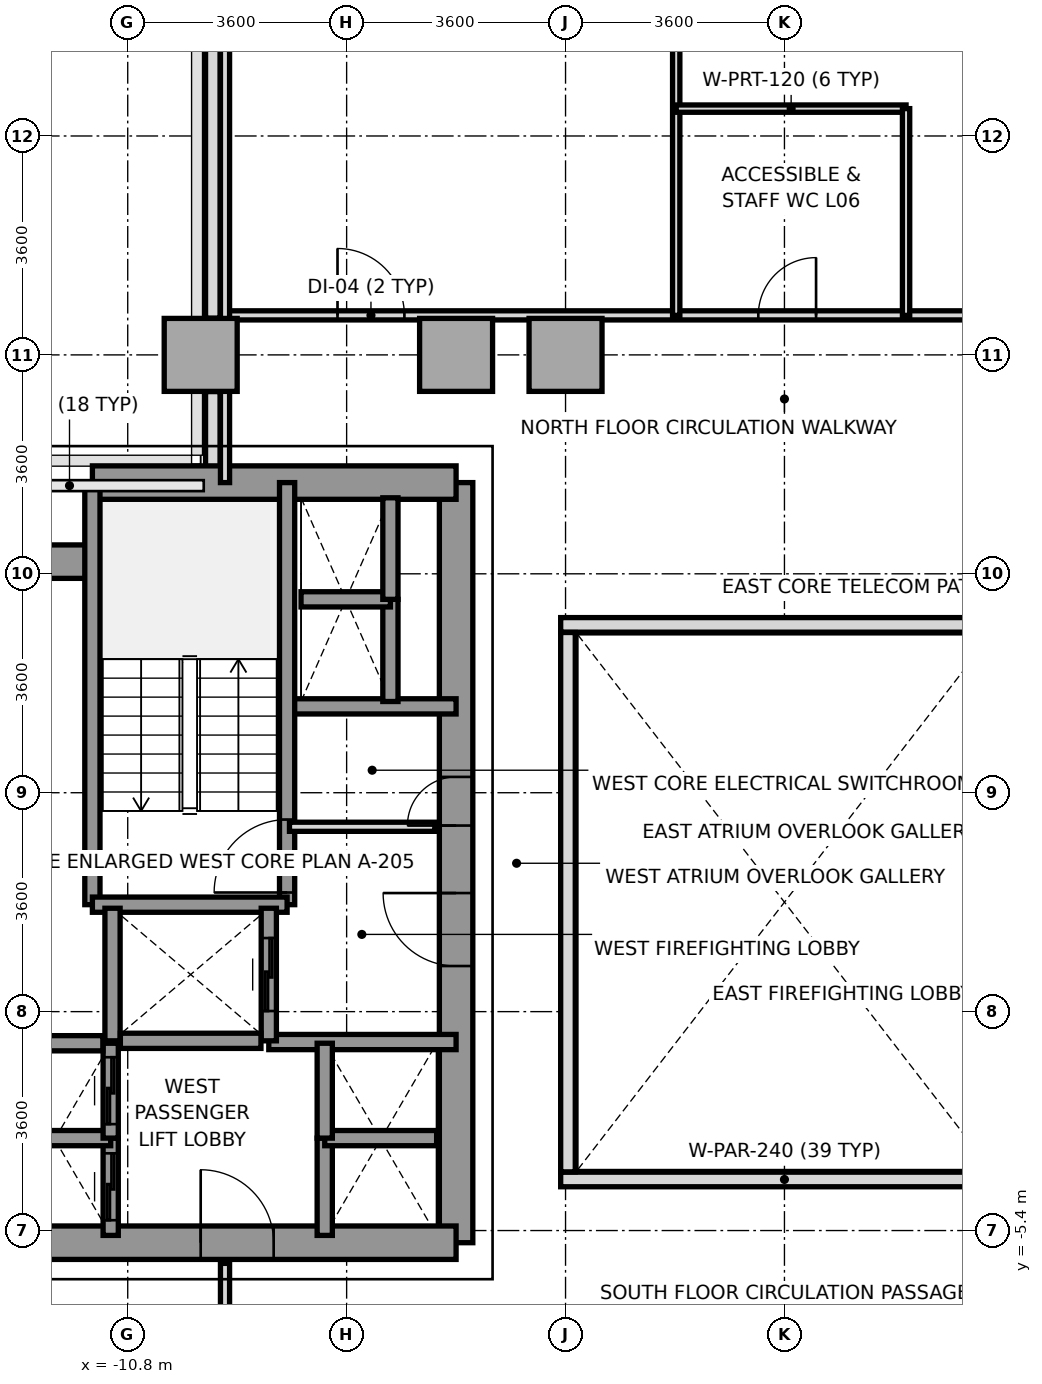
"""IFC4 building model, lengths in metres.
Left out: names, types, materials, properties, quantities, classifications, styles, units other than length and angle.
Written with IfcOpenShell. Run it as: python <this file> out.ifc"""

import sys

from ifc_helpers import new_model, si_unit, direction, frame, frame_2d, origin, origin_2d, place, context, subcontext, project, spatial, rectangle, extrude, source, transform, mapped, element, fill, save


model = new_model("IFC4")
c1 = context("Model", 3, precision=1e-05, world=origin(), true_north=direction((0.0, 1.0)))
c2 = subcontext(c1, "Body", "Model", "MODEL_VIEW")
j1 = project(units=[si_unit("LENGTHUNIT", "METRE"), si_unit("PLANEANGLEUNIT", "RADIAN")], contexts=[c1])
p1 = place(None, origin())
s1 = spatial("IfcSite", under=j1, at=p1, CompositionType="ELEMENT")
p2 = place(p1, origin())
s2 = spatial("IfcBuilding", under=s1, at=p2, CompositionType="ELEMENT")
p3 = place(p2, frame((0.0, 0.0, 30.6)))
s3 = spatial("IfcBuildingStorey", under=s2, at=p3, CompositionType="ELEMENT", Elevation=30.6)
m1 = source(origin(), c2, "Body", "SweptSolid", [
    extrude(rectangle(XDim=1.2, YDim=1.2, at=origin_2d()), origin(), (0.0, 0.0, 1.0), 3.2),
])
for number, where, z_axis, x_axis in (
    (1, (-9.6, 9.0, 0.0), (0.0, 0.0, 1.0), (1.0, 0.0, 0.0)),
    (2, (-5.4, 9.0, 0.0), (0.0, 0.0, 1.0), (1.0, 0.0, 0.0)),
    (3, (-3.6, 9.0, 0.0), (0.0, 0.0, 1.0), (1.0, 0.0, 0.0)),
):
    element("IfcColumn", number, at=place(p3, frame(where, z_axis=z_axis, x_axis=x_axis)), inside=s3, PredefinedType="COLUMN", context=c2, shape_type="MappedRepresentation", body=[
        mapped(m1, transform((0.0, 0.0, 0.0), x_axis=(1.0, 0.0, 0.0), y_axis=(0.0, 1.0, 0.0), z_axis=(0.0, 0.0, 1.0), scale=1.0)),
    ])
p4 = place(p3, frame((-9.4, 6.953, 0.0), z_axis=(0.0, 0.0, 1.0), x_axis=(0.0, 1.0, 0.0)))
e4 = element("IfcWall", 4, at=p4, inside=s3, PredefinedType="PARAPET", context=c2, shape_type="SweptSolid", body=[
    extrude(rectangle(XDim=1.444, YDim=0.24, at=frame_2d((0.722, 0.0))), origin(), (0.0, 0.0, 1.0), 1.15),
])
p5 = place(p3, frame((-9.4, 9.603, 0.0), z_axis=(0.0, 0.0, 1.0), x_axis=(0.0, 1.0, 0.0)))
e5 = element("IfcWall", 5, at=p5, inside=s3, PredefinedType="PARAPET", context=c2, shape_type="SweptSolid", body=[
    extrude(rectangle(XDim=6.0, YDim=0.24, at=frame_2d((3.0, 0.0))), origin(), (0.0, 0.0, 1.0), 1.15),
])
p6 = place(p3, frame((-5.4, -5.6, 0.0), z_axis=(0.0, 0.0, 1.0), x_axis=(0.0, 1.0, 0.0)))
e6 = element("IfcWall", 6, at=p6, inside=s3, PredefinedType="SHEAR", context=c2, shape_type="SweptSolid", body=[
    extrude(rectangle(XDim=12.5, YDim=0.55, at=frame_2d((6.25, 0.0))), origin(), (0.0, 0.0, 1.0), 3.2),
])
p7 = place(p6, frame((4.55, 0.0, 0.0)))
e7 = element("IfcOpeningElement", 7, at=p7, cuts=e6, PredefinedType="OPENING", context=c2, shape_type="SweptSolid", body=[
    extrude(rectangle(XDim=1.2, YDim=2.2, at=frame_2d((0.6, 1.1))), frame((0.0, 0.285, 0.0), z_axis=(0.0, -1.0, 0.0), x_axis=(1.0, 0.0, 0.0)), (0.0, 0.0, 1.0), 0.57),
])
p8 = place(p6, frame((6.86, 0.0, 0.0)))
e8 = element("IfcOpeningElement", 8, at=p8, cuts=e6, PredefinedType="OPENING", context=c2, shape_type="SweptSolid", body=[
    extrude(rectangle(XDim=0.8, YDim=2.1, at=frame_2d((0.4, 1.05))), frame((0.0, 0.285, 0.0), z_axis=(0.0, -1.0, 0.0), x_axis=(1.0, 0.0, 0.0)), (0.0, 0.0, 1.0), 0.57),
])
p9 = place(p3, frame((-11.381, 6.9, 0.0), z_axis=(0.0, 0.0, 1.0), x_axis=(1.0, 0.0, 0.0)))
e9 = element("IfcWall", 9, at=p9, inside=s3, PredefinedType="SHEAR", context=c2, shape_type="SweptSolid", body=[
    extrude(rectangle(XDim=5.981, YDim=0.55, at=frame_2d((2.991, 0.0))), origin(), (0.0, 0.0, 1.0), 3.2),
])
p10 = place(p3, frame((-13.2, 5.6, 0.0), z_axis=(0.0, 0.0, 1.0), x_axis=(1.0, 0.0, 0.0)))
e10 = element("IfcWall", 10, at=p10, inside=s3, PredefinedType="SHEAR", context=c2, shape_type="SweptSolid", body=[
    extrude(rectangle(XDim=1.819, YDim=0.55, at=frame_2d((0.909, 0.0))), origin(), (0.0, 0.0, 1.0), 3.2),
])
p11 = place(p3, frame((-13.2, -5.6, 0.0), z_axis=(0.0, 0.0, 1.0), x_axis=(1.0, 0.0, 0.0)))
e11 = element("IfcWall", 11, at=p11, inside=s3, PredefinedType="SHEAR", context=c2, shape_type="SweptSolid", body=[
    extrude(rectangle(XDim=7.8, YDim=0.55, at=frame_2d((3.9, 0.0))), origin(), (0.0, 0.0, 1.0), 3.2),
])
p12 = place(p11, frame((3.6, 0.0, 0.0)))
e12 = element("IfcOpeningElement", 12, at=p12, cuts=e11, PredefinedType="OPENING", context=c2, shape_type="SweptSolid", body=[
    extrude(rectangle(XDim=1.2, YDim=2.2, at=frame_2d((0.6, 1.1))), frame((0.0, 0.285, 0.0), z_axis=(0.0, -1.0, 0.0), x_axis=(1.0, 0.0, 0.0)), (0.0, 0.0, 1.0), 0.57),
])
p13 = place(p3, frame((-8.18, 3.22, 0.0), z_axis=(0.0, 0.0, 1.0), x_axis=(1.0, 0.0, 0.0)))
e13 = element("IfcWall", 13, at=p13, inside=s3, PredefinedType="SOLIDWALL", context=c2, shape_type="SweptSolid", body=[
    extrude(rectangle(XDim=2.78, YDim=0.25, at=frame_2d((1.39, 0.0))), origin(), (0.0, 0.0, 1.0), 3.2),
])
p14 = place(p3, frame((-8.48, -2.3, 0.0), z_axis=(0.0, 0.0, 1.0), x_axis=(1.0, 0.0, 0.0)))
e14 = element("IfcWall", 14, at=p14, inside=s3, PredefinedType="SOLIDWALL", context=c2, shape_type="SweptSolid", body=[
    extrude(rectangle(XDim=3.08, YDim=0.25, at=frame_2d((1.54, 0.0))), origin(), (0.0, 0.0, 1.0), 3.2),
])
p15 = place(p3, frame((-8.179, -0.041, 0.0), z_axis=(0.0, 0.0, 1.0), x_axis=(0.0, 1.0, 0.0)))
e15 = element("IfcWall", 15, at=p15, inside=s3, PredefinedType="SOLIDWALL", context=c2, shape_type="SweptSolid", body=[
    extrude(rectangle(XDim=6.941, YDim=0.25, at=frame_2d((3.47, 0.0))), origin(), (0.0, 0.0, 1.0), 3.2),
])
p16 = place(p15, frame((0.2, 0.0, 0.0)))
e16 = element("IfcOpeningElement", 16, at=p16, cuts=e15, PredefinedType="OPENING", context=c2, shape_type="SweptSolid", body=[
    extrude(rectangle(XDim=1.2, YDim=2.2, at=frame_2d((0.6, 1.1))), frame((0.0, 0.135, 0.0), z_axis=(0.0, -1.0, 0.0), x_axis=(1.0, 0.0, 0.0)), (0.0, 0.0, 1.0), 0.27),
])
p17 = place(p3, frame((-11.381, -0.041, 0.0), z_axis=(0.0, 0.0, 1.0), x_axis=(0.0, 1.0, 0.0)))
e17 = element("IfcWall", 17, at=p17, inside=s3, PredefinedType="SOLIDWALL", context=c2, shape_type="SweptSolid", body=[
    extrude(rectangle(XDim=6.941, YDim=0.25, at=frame_2d((3.47, 0.0))), origin(), (0.0, 0.0, 1.0), 3.2),
])
p18 = place(p3, frame((-11.381, -0.041, 0.0), z_axis=(0.0, 0.0, 1.0), x_axis=(1.0, 0.0, 0.0)))
e18 = element("IfcWall", 18, at=p18, inside=s3, PredefinedType="SOLIDWALL", context=c2, shape_type="SweptSolid", body=[
    extrude(rectangle(XDim=3.202, YDim=0.25, at=frame_2d((1.601, 0.0))), origin(), (0.0, 0.0, 1.0), 3.2),
])
p19 = place(p3, frame((-11.05, -2.28, 0.0), z_axis=(0.0, 0.0, 1.0), x_axis=(0.0, 1.0, 0.0)))
e19 = element("IfcWall", 19, at=p19, inside=s3, PredefinedType="SOLIDWALL", context=c2, shape_type="SweptSolid", body=[
    extrude(rectangle(XDim=2.18, YDim=0.25, at=frame_2d((1.09, 0.0))), origin(), (0.0, 0.0, 1.0), 3.2),
])
p20 = place(p3, frame((-8.48, -2.28, 0.0), z_axis=(0.0, 0.0, 1.0), x_axis=(0.0, 1.0, 0.0)))
e20 = element("IfcWall", 20, at=p20, inside=s3, PredefinedType="SOLIDWALL", context=c2, shape_type="SweptSolid", body=[
    extrude(rectangle(XDim=2.18, YDim=0.25, at=frame_2d((1.09, 0.0))), origin(), (0.0, 0.0, 1.0), 3.2),
])
p21 = place(p20, frame((0.49, 0.0, 0.0)))
e21 = element("IfcOpeningElement", 21, at=p21, cuts=e20, PredefinedType="OPENING", context=c2, shape_type="SweptSolid", body=[
    extrude(rectangle(XDim=1.2, YDim=2.2, at=frame_2d((0.6, 1.1))), frame((0.0, 0.135, 0.0), z_axis=(0.0, -1.0, 0.0), x_axis=(1.0, 0.0, 0.0)), (0.0, 0.0, 1.0), 0.27),
])
p22 = place(p3, frame((-10.921, -2.28, 0.0), z_axis=(0.0, 0.0, 1.0), x_axis=(1.0, 0.0, 0.0)))
e22 = element("IfcWall", 22, at=p22, inside=s3, PredefinedType="SOLIDWALL", context=c2, shape_type="SweptSolid", body=[
    extrude(rectangle(XDim=2.312, YDim=0.25, at=frame_2d((1.156, 0.0))), origin(), (0.0, 0.0, 1.0), 3.2),
])
p23 = place(p3, frame((-11.08, -5.48, 0.0), z_axis=(0.0, 0.0, 1.0), x_axis=(0.0, 1.0, 0.0)))
e23 = element("IfcWall", 23, at=p23, inside=s3, PredefinedType="SOLIDWALL", context=c2, shape_type="SweptSolid", body=[
    extrude(rectangle(XDim=1.6, YDim=0.25, at=frame_2d((0.8, 0.0))), origin(), (0.0, 0.0, 1.0), 3.2),
])
p24 = place(p23, frame((0.25, 0.0, 0.0)))
e24 = element("IfcOpeningElement", 24, at=p24, cuts=e23, PredefinedType="OPENING", context=c2, shape_type="SweptSolid", body=[
    extrude(rectangle(XDim=1.1, YDim=2.2, at=frame_2d((0.55, 1.1))), frame((0.0, 0.135, 0.0), z_axis=(0.0, -1.0, 0.0), x_axis=(1.0, 0.0, 0.0)), (0.0, 0.0, 1.0), 0.27),
])
p25 = place(p3, frame((-12.92, -3.88, 0.0), z_axis=(0.0, 0.0, 1.0), x_axis=(1.0, 0.0, 0.0)))
e25 = element("IfcWall", 25, at=p25, inside=s3, PredefinedType="SOLIDWALL", context=c2, shape_type="SweptSolid", body=[
    extrude(rectangle(XDim=1.84, YDim=0.25, at=frame_2d((0.92, 0.0))), origin(), (0.0, 0.0, 1.0), 3.2),
])
p26 = place(p3, frame((-11.08, -3.88, 0.0), z_axis=(0.0, 0.0, 1.0), x_axis=(0.0, 1.0, 0.0)))
e26 = element("IfcWall", 26, at=p26, inside=s3, PredefinedType="SOLIDWALL", context=c2, shape_type="SweptSolid", body=[
    extrude(rectangle(XDim=1.56, YDim=0.25, at=frame_2d((0.78, 0.0))), origin(), (0.0, 0.0, 1.0), 3.2),
])
p27 = place(p26, frame((0.23, 0.0, 0.0)))
e27 = element("IfcOpeningElement", 27, at=p27, cuts=e26, PredefinedType="OPENING", context=c2, shape_type="SweptSolid", body=[
    extrude(rectangle(XDim=1.1, YDim=2.2, at=frame_2d((0.55, 1.1))), frame((0.0, 0.135, 0.0), z_axis=(0.0, -1.0, 0.0), x_axis=(1.0, 0.0, 0.0)), (0.0, 0.0, 1.0), 0.27),
])
p28 = place(p3, frame((-12.791, -2.32, 0.0), z_axis=(0.0, 0.0, 1.0), x_axis=(1.0, 0.0, 0.0)))
e28 = element("IfcWall", 28, at=p28, inside=s3, PredefinedType="SOLIDWALL", context=c2, shape_type="SweptSolid", body=[
    extrude(rectangle(XDim=1.582, YDim=0.25, at=frame_2d((0.791, 0.0))), origin(), (0.0, 0.0, 1.0), 3.2),
])
p29 = place(p3, frame((-7.56, -5.48, 0.0), z_axis=(0.0, 0.0, 1.0), x_axis=(0.0, 1.0, 0.0)))
e29 = element("IfcWall", 29, at=p29, inside=s3, PredefinedType="SOLIDWALL", context=c2, shape_type="SweptSolid", body=[
    extrude(rectangle(XDim=1.6, YDim=0.25, at=frame_2d((0.8, 0.0))), origin(), (0.0, 0.0, 1.0), 3.2),
])
p30 = place(p3, frame((-7.56, -3.88, 0.0), z_axis=(0.0, 0.0, 1.0), x_axis=(1.0, 0.0, 0.0)))
e30 = element("IfcWall", 30, at=p30, inside=s3, PredefinedType="SOLIDWALL", context=c2, shape_type="SweptSolid", body=[
    extrude(rectangle(XDim=1.84, YDim=0.25, at=frame_2d((0.92, 0.0))), origin(), (0.0, 0.0, 1.0), 3.2),
])
p31 = place(p3, frame((-7.56, -3.88, 0.0), z_axis=(0.0, 0.0, 1.0), x_axis=(0.0, 1.0, 0.0)))
e31 = element("IfcWall", 31, at=p31, inside=s3, PredefinedType="SOLIDWALL", context=c2, shape_type="SweptSolid", body=[
    extrude(rectangle(XDim=1.56, YDim=0.25, at=frame_2d((0.78, 0.0))), origin(), (0.0, 0.0, 1.0), 3.2),
])
p32 = place(p3, frame((-6.48, 3.3, 0.0), z_axis=(0.0, 0.0, 1.0), x_axis=(0.0, 1.0, 0.0)))
e32 = element("IfcWall", 32, at=p32, inside=s3, PredefinedType="SOLIDWALL", context=c2, shape_type="SweptSolid", body=[
    extrude(rectangle(XDim=1.68, YDim=0.25, at=frame_2d((0.84, 0.0))), origin(), (0.0, 0.0, 1.0), 3.2),
])
p33 = place(p3, frame((-7.95, 4.98, 0.0), z_axis=(0.0, 0.0, 1.0), x_axis=(1.0, 0.0, 0.0)))
e33 = element("IfcWall", 33, at=p33, inside=s3, PredefinedType="SOLIDWALL", context=c2, shape_type="SweptSolid", body=[
    extrude(rectangle(XDim=1.47, YDim=0.25, at=frame_2d((0.735, 0.0))), origin(), (0.0, 0.0, 1.0), 3.2),
])
p34 = place(p3, frame((-6.48, 4.98, 0.0), z_axis=(0.0, 0.0, 1.0), x_axis=(0.0, 1.0, 0.0)))
e34 = element("IfcWall", 34, at=p34, inside=s3, PredefinedType="SOLIDWALL", context=c2, shape_type="SweptSolid", body=[
    extrude(rectangle(XDim=1.67, YDim=0.25, at=frame_2d((0.835, 0.0))), origin(), (0.0, 0.0, 1.0), 3.2),
])
p35 = place(p3, frame((-8.14, 1.24, 0.0), z_axis=(0.0, 0.0, 1.0), x_axis=(1.0, 0.0, 0.0)))
e35 = element("IfcWall", 35, at=p35, inside=s3, PredefinedType="PARTITIONING", context=c2, shape_type="SweptSolid", body=[
    extrude(rectangle(XDim=2.39, YDim=0.15, at=frame_2d((1.195, 0.0))), origin(), (0.0, 0.0, 1.0), 2.3),
])
p36 = place(p3, frame((-9.2, 9.65, 0.0), z_axis=(0.0, 0.0, 1.0), x_axis=(1.0, 0.0, 0.0)))
e36 = element("IfcWall", 36, at=p36, inside=s3, PredefinedType="PARTITIONING", context=c2, shape_type="SweptSolid", body=[
    extrude(rectangle(XDim=18.4, YDim=0.15, at=frame_2d((9.2, 0.0))), origin(), (0.0, 0.0, 1.0), 3.2),
])
p37 = place(p36, frame((8.77, 0.0, 0.0)))
e37 = element("IfcOpeningElement", 37, at=p37, cuts=e36, PredefinedType="OPENING", context=c2, shape_type="SweptSolid", body=[
    extrude(rectangle(XDim=0.95, YDim=2.15, at=frame_2d((0.475, 1.075))), frame((0.0, 0.085, 0.0), z_axis=(0.0, -1.0, 0.0), x_axis=(1.0, 0.0, 0.0)), (0.0, 0.0, 1.0), 0.17),
])
p38 = place(p36, frame((1.85, 0.0, 0.0)))
e38 = element("IfcOpeningElement", 38, at=p38, cuts=e36, PredefinedType="OPENING", context=c2, shape_type="SweptSolid", body=[
    extrude(rectangle(XDim=1.1, YDim=2.2, at=frame_2d((0.55, 1.1))), frame((0.0, 0.085, 0.0), z_axis=(0.0, -1.0, 0.0), x_axis=(1.0, 0.0, 0.0)), (0.0, 0.0, 1.0), 0.17),
])
p39 = place(p36, frame((15.6, 0.0, 0.0)))
e39 = element("IfcOpeningElement", 39, at=p39, cuts=e36, PredefinedType="OPENING", context=c2, shape_type="SweptSolid", body=[
    extrude(rectangle(XDim=0.95, YDim=2.15, at=frame_2d((0.475, 1.075))), frame((0.0, 0.085, 0.0), z_axis=(0.0, -1.0, 0.0), x_axis=(1.0, 0.0, 0.0)), (0.0, 0.0, 1.0), 0.17),
])
p40 = place(p3, frame((-9.2, 6.9, 0.0), z_axis=(0.0, 0.0, 1.0), x_axis=(0.0, 1.0, 0.0)))
e40 = element("IfcWall", 40, at=p40, inside=s3, PredefinedType="PARTITIONING", context=c2, shape_type="SweptSolid", body=[
    extrude(rectangle(XDim=8.78, YDim=0.15, at=frame_2d((4.39, 0.0))), origin(), (0.0, 0.0, 1.0), 2.65),
])
p41 = place(p3, frame((-1.78, 9.65, 0.0), z_axis=(0.0, 0.0, 1.0), x_axis=(0.0, 1.0, 0.0)))
e41 = element("IfcWall", 41, at=p41, inside=s3, PredefinedType="PARTITIONING", context=c2, shape_type="SweptSolid", body=[
    extrude(rectangle(XDim=15.0, YDim=0.12, at=frame_2d((7.5, 0.0))), origin(), (0.0, 0.0, 1.0), 2.65),
])
p42 = place(p3, frame((-1.78, 13.05, 0.0), z_axis=(0.0, 0.0, 1.0), x_axis=(1.0, 0.0, 0.0)))
e42 = element("IfcWall", 42, at=p42, inside=s3, PredefinedType="PARTITIONING", context=c2, shape_type="SweptSolid", body=[
    extrude(rectangle(XDim=3.78, YDim=0.12, at=frame_2d((1.89, 0.0))), origin(), (0.0, 0.0, 1.0), 3.2),
])
p43 = place(p3, frame((2.0, 9.65, 0.0), z_axis=(0.0, 0.0, 1.0), x_axis=(0.0, 1.0, 0.0)))
e43 = element("IfcWall", 43, at=p43, inside=s3, PredefinedType="PARTITIONING", context=c2, shape_type="SweptSolid", body=[
    extrude(rectangle(XDim=3.4, YDim=0.12, at=frame_2d((1.7, 0.0))), origin(), (0.0, 0.0, 1.0), 3.2),
])
p44 = place(p3, frame((-9.2, -15.68, 0.0), z_axis=(0.0, 0.0, 1.0), x_axis=(0.0, 1.0, 0.0)))
e44 = element("IfcWall", 44, at=p44, inside=s3, PredefinedType="PARTITIONING", context=c2, shape_type="SweptSolid", body=[
    extrude(rectangle(XDim=9.74, YDim=0.15, at=frame_2d((4.87, 0.0))), origin(), (0.0, 0.0, 1.0), 2.65),
])
for number, where, z_axis, x_axis in (
    (45, (-3.68, -4.56, 0.0), (0.0, 0.0, 1.0), (1.0, 0.0, 0.0)),
    (46, (-3.68, 4.56, 0.0), (0.0, 0.0, 1.0), (1.0, 0.0, 0.0)),
):
    element("IfcWall", number, at=place(p3, frame(where, z_axis=z_axis, x_axis=x_axis)), inside=s3, PredefinedType="PARAPET", context=c2, shape_type="SweptSolid", body=[
        extrude(rectangle(XDim=7.36, YDim=0.24, at=frame_2d((3.68, 0.0))), origin(), (0.0, 0.0, 1.0), 1.15),
    ])
p45 = place(p3, frame((-3.56, -4.435, 0.0), z_axis=(0.0, 0.0, 1.0), x_axis=(0.0, 1.0, 0.0)))
e47 = element("IfcWall", 47, at=p45, inside=s3, PredefinedType="PARAPET", context=c2, shape_type="SweptSolid", body=[
    extrude(rectangle(XDim=8.87, YDim=0.24, at=frame_2d((4.435, 0.0))), origin(), (0.0, 0.0, 1.0), 1.15),
])
m2 = source(origin(), c2, "Body", "SweptSolid", [
    extrude(rectangle(XDim=1.2, YDim=2.2, at=frame_2d((0.6, 1.1))), frame((0.0, 0.025, 0.0), z_axis=(0.0, -1.0, 0.0), x_axis=(1.0, 0.0, 0.0)), (0.0, 0.0, 1.0), 0.05),
])
p46 = place(p16, origin())
e48 = element("IfcDoor", 48, at=p46, inside=s3, OperationType="SINGLE_SWING_LEFT", PredefinedType="DOOR", context=c2, shape_type="MappedRepresentation", body=[
    mapped(m2, transform((0.0, 0.0, 0.0), x_axis=(1.0, 0.0, 0.0), y_axis=(0.0, 1.0, 0.0), z_axis=(0.0, 0.0, 1.0), scale=1.0)),
])
fill(e16, e48)
p47 = place(p7, origin())
e49 = element("IfcDoor", 49, at=p47, inside=s3, OperationType="SINGLE_SWING_RIGHT", PredefinedType="DOOR", context=c2, shape_type="MappedRepresentation", body=[
    mapped(m2, transform((0.0, 0.0, 0.0), x_axis=(1.0, 0.0, 0.0), y_axis=(0.0, 1.0, 0.0), z_axis=(0.0, 0.0, 1.0), scale=1.0)),
])
fill(e7, e49)
p48 = place(p12, origin())
e50 = element("IfcDoor", 50, at=p48, inside=s3, OperationType="SINGLE_SWING_LEFT", PredefinedType="DOOR", context=c2, shape_type="MappedRepresentation", body=[
    mapped(m2, transform((0.0, 0.0, 0.0), x_axis=(1.0, 0.0, 0.0), y_axis=(0.0, 1.0, 0.0), z_axis=(0.0, 0.0, 1.0), scale=1.0)),
])
fill(e12, e50)
m3 = source(origin(), c2, "Body", "SweptSolid", [
    extrude(rectangle(XDim=0.8, YDim=2.1, at=frame_2d((0.4, 1.05))), frame((0.0, 0.025, 0.0), z_axis=(0.0, -1.0, 0.0), x_axis=(1.0, 0.0, 0.0)), (0.0, 0.0, 1.0), 0.05),
])
p49 = place(p8, origin())
e51 = element("IfcDoor", 51, at=p49, inside=s3, OperationType="SINGLE_SWING_LEFT", PredefinedType="DOOR", context=c2, shape_type="MappedRepresentation", body=[
    mapped(m3, transform((0.0, 0.0, 0.0), x_axis=(1.0, 0.0, 0.0), y_axis=(0.0, 1.0, 0.0), z_axis=(0.0, 0.0, 1.0), scale=1.0)),
])
fill(e8, e51)
p50 = place(p21, origin())
e52 = element("IfcDoor", 52, at=p50, inside=s3, OperationType="SLIDING_TO_RIGHT", PredefinedType="DOOR", context=c2, shape_type="MappedRepresentation", body=[
    mapped(m2, transform((0.0, 0.0, 0.0), x_axis=(1.0, 0.0, 0.0), y_axis=(0.0, 1.0, 0.0), z_axis=(0.0, 0.0, 1.0), scale=1.0)),
])
fill(e21, e52)
m4 = source(origin(), c2, "Body", "SweptSolid", [
    extrude(rectangle(XDim=1.1, YDim=2.2, at=frame_2d((0.55, 1.1))), frame((0.0, 0.025, 0.0), z_axis=(0.0, -1.0, 0.0), x_axis=(1.0, 0.0, 0.0)), (0.0, 0.0, 1.0), 0.05),
])
p51 = place(p24, origin())
e53 = element("IfcDoor", 53, at=p51, inside=s3, OperationType="SLIDING_TO_LEFT", PredefinedType="DOOR", context=c2, shape_type="MappedRepresentation", body=[
    mapped(m4, transform((0.0, 0.0, 0.0), x_axis=(1.0, 0.0, 0.0), y_axis=(0.0, 1.0, 0.0), z_axis=(0.0, 0.0, 1.0), scale=1.0)),
])
fill(e24, e53)
p52 = place(p27, origin())
e54 = element("IfcDoor", 54, at=p52, inside=s3, OperationType="SLIDING_TO_LEFT", PredefinedType="DOOR", context=c2, shape_type="MappedRepresentation", body=[
    mapped(m4, transform((0.0, 0.0, 0.0), x_axis=(1.0, 0.0, 0.0), y_axis=(0.0, 1.0, 0.0), z_axis=(0.0, 0.0, 1.0), scale=1.0)),
])
fill(e27, e54)
m5 = source(origin(), c2, "Body", "SweptSolid", [
    extrude(rectangle(XDim=0.95, YDim=2.15, at=frame_2d((0.475, 1.075))), frame((0.0, 0.025, 0.0), z_axis=(0.0, -1.0, 0.0), x_axis=(1.0, 0.0, 0.0)), (0.0, 0.0, 1.0), 0.05),
])
p53 = place(p37, origin())
e55 = element("IfcDoor", 55, at=p53, inside=s3, OperationType="SINGLE_SWING_RIGHT", PredefinedType="DOOR", context=c2, shape_type="MappedRepresentation", body=[
    mapped(m5, transform((0.0, 0.0, 0.0), x_axis=(1.0, 0.0, 0.0), y_axis=(0.0, 1.0, 0.0), z_axis=(0.0, 0.0, 1.0), scale=1.0)),
])
fill(e37, e55)
p54 = place(p38, origin())
e56 = element("IfcDoor", 56, at=p54, inside=s3, OperationType="SINGLE_SWING_LEFT", PredefinedType="DOOR", context=c2, shape_type="MappedRepresentation", body=[
    mapped(m4, transform((0.0, 0.0, 0.0), x_axis=(1.0, 0.0, 0.0), y_axis=(0.0, 1.0, 0.0), z_axis=(0.0, 0.0, 1.0), scale=1.0)),
])
fill(e38, e56)
save(model, sys.argv[1])
